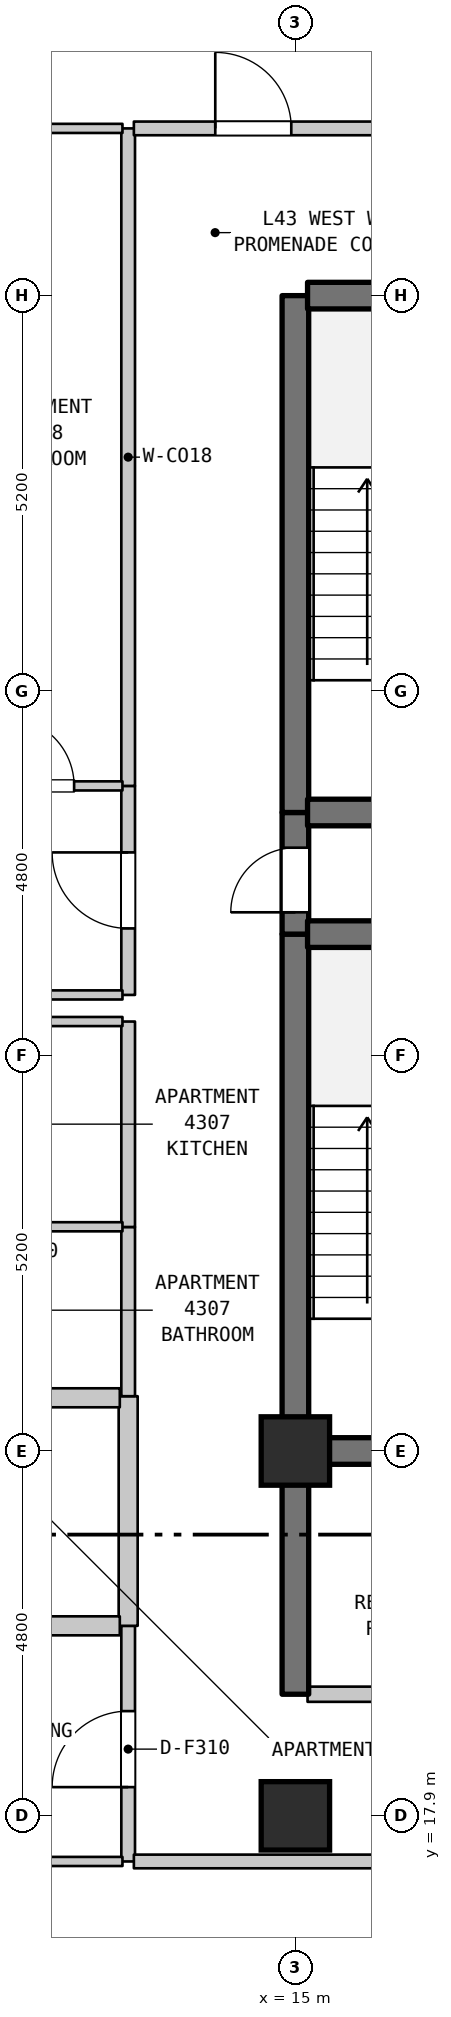
"""IFC4 building model, lengths in metres.
Left out: names, types, materials, properties, quantities, classifications, styles, units other than length and angle.
Written with IfcOpenShell. Run it as: python <this file> out.ifc"""

import sys

from ifc_helpers import new_model, si_unit, direction, frame, frame_2d, origin, origin_2d, place, context, subcontext, project, spatial, rectangle, extrude, element, fill, save


model = new_model("IFC4")
c1 = context("Model", 3, precision=1e-05, world=origin(), true_north=direction((0.0, 1.0)))
c2 = subcontext(c1, "Body", "Model", "MODEL_VIEW")
j1 = project(units=[si_unit("LENGTHUNIT", "METRE"), si_unit("PLANEANGLEUNIT", "RADIAN")], contexts=[c1])
p1 = place(None, origin())
s1 = spatial("IfcSite", under=j1, at=p1, CompositionType="ELEMENT")
p2 = place(p1, origin())
s2 = spatial("IfcBuilding", under=s1, at=p2, CompositionType="ELEMENT")
p3 = place(p2, frame((0.0, 0.0, 176.5)))
s3 = spatial("IfcBuildingStorey", under=s2, at=p3, CompositionType="ELEMENT", Elevation=176.5)
for number, where, z_axis, x_axis in (
    (1, (15.0, 17.9, 0.0), (0.0, 0.0, 1.0), (1.0, 0.0, 0.0)),
    (2, (15.0, 22.7, 0.0), (0.0, 0.0, 1.0), (1.0, 0.0, 0.0)),
):
    element("IfcColumn", number, at=place(p3, frame(where, z_axis=z_axis, x_axis=x_axis)), inside=s3, PredefinedType="COLUMN", context=c2, shape_type="SweptSolid", body=[
        extrude(rectangle(XDim=0.9, YDim=0.9, at=origin_2d()), origin(), (0.0, 0.0, 1.0), 3.7),
    ])
p4 = place(p3, frame((12.8, 17.3, 0.0), z_axis=(0.0, 0.0, 1.0), x_axis=(0.0, 1.0, 0.0)))
e3 = element("IfcWall", 3, at=p4, inside=s3, PredefinedType="STANDARD", context=c2, shape_type="SweptSolid", body=[
    extrude(rectangle(XDim=3.1, YDim=0.18, at=frame_2d((1.55, 0.0))), origin(), (0.0, 0.0, 1.0), 3.39),
])
p5 = place(p4, frame((0.978, 0.0, 0.0)))
e4 = element("IfcOpeningElement", 4, at=p5, cuts=e3, PredefinedType="OPENING", context=c2, shape_type="SweptSolid", body=[
    extrude(rectangle(XDim=1.0, YDim=2.15, at=frame_2d((0.5, 1.075))), frame((0.0, 0.1, 0.0), z_axis=(0.0, -1.0, 0.0), x_axis=(1.0, 0.0, 0.0)), (0.0, 0.0, 1.0), 0.2),
])
p6 = place(p3, frame((12.8, 20.4, 0.0), z_axis=(0.0, 0.0, 1.0), x_axis=(0.0, 1.0, 0.0)))
e5 = element("IfcWall", 5, at=p6, inside=s3, PredefinedType="STANDARD", context=c2, shape_type="SweptSolid", body=[
    extrude(rectangle(XDim=3.021, YDim=0.25, at=frame_2d((1.51, 0.0))), origin(), (0.0, 0.0, 1.0), 3.39),
])
p7 = place(p3, frame((12.8, 23.421, 0.0), z_axis=(0.0, 0.0, 1.0), x_axis=(0.0, 1.0, 0.0)))
e6 = element("IfcWall", 6, at=p7, inside=s3, PredefinedType="STANDARD", context=c2, shape_type="SweptSolid", body=[
    extrude(rectangle(XDim=2.226, YDim=0.18, at=frame_2d((1.113, 0.0))), origin(), (0.0, 0.0, 1.0), 3.39),
])
p8 = place(p3, frame((12.8, 25.647, 0.0), z_axis=(0.0, 0.0, 1.0), x_axis=(0.0, 1.0, 0.0)))
e7 = element("IfcWall", 7, at=p8, inside=s3, PredefinedType="STANDARD", context=c2, shape_type="SweptSolid", body=[
    extrude(rectangle(XDim=2.703, YDim=0.18, at=frame_2d((1.352, 0.0))), origin(), (0.0, 0.0, 1.0), 3.39),
])
p9 = place(p3, frame((12.8, 28.7, 0.0), z_axis=(0.0, 0.0, 1.0), x_axis=(0.0, 1.0, 0.0)))
e8 = element("IfcWall", 8, at=p9, inside=s3, PredefinedType="STANDARD", context=c2, shape_type="SweptSolid", body=[
    extrude(rectangle(XDim=2.75, YDim=0.18, at=frame_2d((1.375, 0.0))), origin(), (0.0, 0.0, 1.0), 3.39),
])
p10 = place(p9, frame((0.875, 0.0, 0.0)))
e9 = element("IfcOpeningElement", 9, at=p10, cuts=e8, PredefinedType="OPENING", context=c2, shape_type="SweptSolid", body=[
    extrude(rectangle(XDim=1.0, YDim=2.15, at=frame_2d((0.5, 1.075))), frame((0.0, 0.1, 0.0), z_axis=(0.0, -1.0, 0.0), x_axis=(1.0, 0.0, 0.0)), (0.0, 0.0, 1.0), 0.2),
])
p11 = place(p3, frame((12.8, 31.45, 0.0), z_axis=(0.0, 0.0, 1.0), x_axis=(0.0, 1.0, 0.0)))
e10 = element("IfcWall", 10, at=p11, inside=s3, PredefinedType="STANDARD", context=c2, shape_type="SweptSolid", body=[
    extrude(rectangle(XDim=8.65, YDim=0.18, at=frame_2d((4.325, 0.0))), origin(), (0.0, 0.0, 1.0), 3.39),
])
p12 = place(p3, frame((15.0, 19.5, 0.0), z_axis=(0.0, 0.0, 1.0), x_axis=(0.0, 1.0, 0.0)))
e11 = element("IfcWall", 11, at=p12, inside=s3, PredefinedType="SHEAR", context=c2, shape_type="SweptSolid", body=[
    extrude(rectangle(XDim=3.2, YDim=0.35, at=frame_2d((1.6, 0.0))), origin(), (0.0, 0.0, 1.0), 3.39),
])
p13 = place(p3, frame((15.0, 22.7, 0.0), z_axis=(0.0, 0.0, 1.0), x_axis=(0.0, 1.0, 0.0)))
e12 = element("IfcWall", 12, at=p13, inside=s3, PredefinedType="SHEAR", context=c2, shape_type="SweptSolid", body=[
    extrude(rectangle(XDim=6.8, YDim=0.35, at=frame_2d((3.4, 0.0))), origin(), (0.0, 0.0, 1.0), 3.39),
])
p14 = place(p3, frame((15.0, 29.5, 0.0), z_axis=(0.0, 0.0, 1.0), x_axis=(0.0, 1.0, 0.0)))
e13 = element("IfcWall", 13, at=p14, inside=s3, PredefinedType="SHEAR", context=c2, shape_type="SweptSolid", body=[
    extrude(rectangle(XDim=1.6, YDim=0.35, at=frame_2d((0.8, 0.0))), origin(), (0.0, 0.0, 1.0), 3.39),
])
p15 = place(p14, frame((0.287, 0.0, 0.0)))
e14 = element("IfcOpeningElement", 14, at=p15, cuts=e13, PredefinedType="OPENING", context=c2, shape_type="SweptSolid", body=[
    extrude(rectangle(XDim=0.85, YDim=2.1, at=frame_2d((0.425, 1.05))), frame((0.0, 0.185, 0.0), z_axis=(0.0, -1.0, 0.0), x_axis=(1.0, 0.0, 0.0)), (0.0, 0.0, 1.0), 0.37),
])
p16 = place(p3, frame((15.0, 31.1, 0.0), z_axis=(0.0, 0.0, 1.0), x_axis=(0.0, 1.0, 0.0)))
e15 = element("IfcWall", 15, at=p16, inside=s3, PredefinedType="SHEAR", context=c2, shape_type="SweptSolid", body=[
    extrude(rectangle(XDim=6.8, YDim=0.35, at=frame_2d((3.4, 0.0))), origin(), (0.0, 0.0, 1.0), 3.39),
])
p17 = place(p3, frame((9.085, 17.3, 0.0), z_axis=(0.0, 0.0, 1.0), x_axis=(1.0, 0.0, 0.0)))
e16 = element("IfcWall", 16, at=p17, inside=s3, PredefinedType="PARTITIONING", context=c2, shape_type="SweptSolid", body=[
    extrude(rectangle(XDim=3.64, YDim=0.12, at=frame_2d((1.82, 0.0))), origin(), (0.0, 0.0, 1.0), 3.39),
])
p18 = place(p3, frame((12.875, 17.3, 0.0), z_axis=(0.0, 0.0, 1.0), x_axis=(1.0, 0.0, 0.0)))
e17 = element("IfcWall", 17, at=p18, inside=s3, PredefinedType="STANDARD", context=c2, shape_type="SweptSolid", body=[
    extrude(rectangle(XDim=7.35, YDim=0.18, at=frame_2d((3.675, 0.0))), origin(), (0.0, 0.0, 1.0), 3.39),
])
p19 = place(p18, frame((3.16, 0.0, 0.0)))
e18 = element("IfcOpeningElement", 18, at=p19, cuts=e17, PredefinedType="OPENING", context=c2, shape_type="SweptSolid", body=[
    extrude(rectangle(XDim=1.0, YDim=2.15, at=frame_2d((0.5, 1.075))), frame((0.0, 0.1, 0.0), z_axis=(0.0, -1.0, 0.0), x_axis=(1.0, 0.0, 0.0)), (0.0, 0.0, 1.0), 0.2),
])
p20 = place(p3, frame((15.16, 19.5, 0.0), z_axis=(0.0, 0.0, 1.0), x_axis=(1.0, 0.0, 0.0)))
e19 = element("IfcWall", 19, at=p20, inside=s3, PredefinedType="STANDARD", context=c2, shape_type="SweptSolid", body=[
    extrude(rectangle(XDim=3.68, YDim=0.2, at=frame_2d((1.84, 0.0))), origin(), (0.0, 0.0, 1.0), 3.39),
])
p21 = place(p20, frame((1.39, 0.0, 0.0)))
e20 = element("IfcOpeningElement", 20, at=p21, cuts=e19, PredefinedType="OPENING", context=c2, shape_type="SweptSolid", body=[
    extrude(rectangle(XDim=0.9, YDim=2.15, at=frame_2d((0.45, 1.075))), frame((0.0, 0.11, 0.0), z_axis=(0.0, -1.0, 0.0), x_axis=(1.0, 0.0, 0.0)), (0.0, 0.0, 1.0), 0.22),
])
p22 = place(p3, frame((10.66, 20.4, 0.0), z_axis=(0.0, 0.0, 1.0), x_axis=(1.0, 0.0, 0.0)))
e21 = element("IfcWall", 21, at=p22, inside=s3, PredefinedType="STANDARD", context=c2, shape_type="SweptSolid", body=[
    extrude(rectangle(XDim=2.03, YDim=0.25, at=frame_2d((1.015, 0.0))), origin(), (0.0, 0.0, 1.0), 3.39),
])
p23 = place(p3, frame((15.16, 22.7, 0.0), z_axis=(0.0, 0.0, 1.0), x_axis=(1.0, 0.0, 0.0)))
e22 = element("IfcWall", 22, at=p23, inside=s3, PredefinedType="SHEAR", context=c2, shape_type="SweptSolid", body=[
    extrude(rectangle(XDim=3.68, YDim=0.35, at=frame_2d((1.84, 0.0))), origin(), (0.0, 0.0, 1.0), 3.39),
])
p24 = place(p3, frame((10.66, 23.4, 0.0), z_axis=(0.0, 0.0, 1.0), x_axis=(1.0, 0.0, 0.0)))
e23 = element("IfcWall", 23, at=p24, inside=s3, PredefinedType="STANDARD", context=c2, shape_type="SweptSolid", body=[
    extrude(rectangle(XDim=2.03, YDim=0.25, at=frame_2d((1.015, 0.0))), origin(), (0.0, 0.0, 1.0), 3.39),
])
for number, where, z_axis, x_axis in (
    (24, (10.595, 25.65, 0.0), (0.0, 0.0, 1.0), (1.0, 0.0, 0.0)),
    (25, (10.595, 28.35, 0.0), (0.0, 0.0, 1.0), (1.0, 0.0, 0.0)),
):
    element("IfcWall", number, at=place(p3, frame(where, z_axis=z_axis, x_axis=x_axis)), inside=s3, PredefinedType="PARTITIONING", context=c2, shape_type="SweptSolid", body=[
        extrude(rectangle(XDim=2.13, YDim=0.12, at=frame_2d((1.065, 0.0))), origin(), (0.0, 0.0, 1.0), 3.39),
    ])
p25 = place(p3, frame((9.03, 28.7, 0.0), z_axis=(0.0, 0.0, 1.0), x_axis=(1.0, 0.0, 0.0)))
e26 = element("IfcWall", 26, at=p25, inside=s3, PredefinedType="PARTITIONING", context=c2, shape_type="SweptSolid", body=[
    extrude(rectangle(XDim=3.695, YDim=0.12, at=frame_2d((1.848, 0.0))), origin(), (0.0, 0.0, 1.0), 3.39),
])
for number, where, z_axis, x_axis in (
    (27, (15.16, 29.5, 0.0), (0.0, 0.0, 1.0), (1.0, 0.0, 0.0)),
    (28, (15.16, 31.1, 0.0), (0.0, 0.0, 1.0), (1.0, 0.0, 0.0)),
):
    element("IfcWall", number, at=place(p3, frame(where, z_axis=z_axis, x_axis=x_axis)), inside=s3, PredefinedType="SHEAR", context=c2, shape_type="SweptSolid", body=[
        extrude(rectangle(XDim=3.68, YDim=0.35, at=frame_2d((1.84, 0.0))), origin(), (0.0, 0.0, 1.0), 3.39),
    ])
p26 = place(p3, frame((10.523, 31.45, 0.0), z_axis=(0.0, 0.0, 1.0), x_axis=(1.0, 0.0, 0.0)))
e29 = element("IfcWall", 29, at=p26, inside=s3, PredefinedType="PARTITIONING", context=c2, shape_type="SweptSolid", body=[
    extrude(rectangle(XDim=2.202, YDim=0.12, at=frame_2d((1.101, 0.0))), origin(), (0.0, 0.0, 1.0), 3.39),
])
p27 = place(p26, frame((0.666, 0.0, 0.0)))
e30 = element("IfcOpeningElement", 30, at=p27, cuts=e29, PredefinedType="OPENING", context=c2, shape_type="SweptSolid", body=[
    extrude(rectangle(XDim=0.9, YDim=2.1, at=frame_2d((0.45, 1.05))), frame((0.0, 0.07, 0.0), z_axis=(0.0, -1.0, 0.0), x_axis=(1.0, 0.0, 0.0)), (0.0, 0.0, 1.0), 0.14),
])
p28 = place(p3, frame((15.16, 37.9, 0.0), z_axis=(0.0, 0.0, 1.0), x_axis=(1.0, 0.0, 0.0)))
e31 = element("IfcWall", 31, at=p28, inside=s3, PredefinedType="SHEAR", context=c2, shape_type="SweptSolid", body=[
    extrude(rectangle(XDim=3.68, YDim=0.35, at=frame_2d((1.84, 0.0))), origin(), (0.0, 0.0, 1.0), 3.39),
])
p29 = place(p3, frame((10.523, 40.1, 0.0), z_axis=(0.0, 0.0, 1.0), x_axis=(1.0, 0.0, 0.0)))
e32 = element("IfcWall", 32, at=p29, inside=s3, PredefinedType="PARTITIONING", context=c2, shape_type="SweptSolid", body=[
    extrude(rectangle(XDim=2.202, YDim=0.12, at=frame_2d((1.101, 0.0))), origin(), (0.0, 0.0, 1.0), 3.39),
])
p30 = place(p3, frame((12.875, 40.1, 0.0), z_axis=(0.0, 0.0, 1.0), x_axis=(1.0, 0.0, 0.0)))
e33 = element("IfcWall", 33, at=p30, inside=s3, PredefinedType="STANDARD", context=c2, shape_type="SweptSolid", body=[
    extrude(rectangle(XDim=3.32, YDim=0.18, at=frame_2d((1.66, 0.0))), origin(), (0.0, 0.0, 1.0), 3.39),
])
p31 = place(p30, frame((1.071, 0.0, 0.0)))
e34 = element("IfcOpeningElement", 34, at=p31, cuts=e33, PredefinedType="OPENING", context=c2, shape_type="SweptSolid", body=[
    extrude(rectangle(XDim=1.0, YDim=2.15, at=frame_2d((0.5, 1.075))), frame((0.0, 0.1, 0.0), z_axis=(0.0, -1.0, 0.0), x_axis=(1.0, 0.0, 0.0)), (0.0, 0.0, 1.0), 0.2),
])
p32 = place(p5, origin())
e35 = element("IfcDoor", 35, at=p32, inside=s3, OperationType="SINGLE_SWING_LEFT", PredefinedType="DOOR", context=c2, shape_type="SweptSolid", body=[
    extrude(rectangle(XDim=1.0, YDim=2.15, at=frame_2d((0.5, 1.075))), frame((0.0, 0.025, 0.0), z_axis=(0.0, -1.0, 0.0), x_axis=(1.0, 0.0, 0.0)), (0.0, 0.0, 1.0), 0.05),
])
fill(e4, e35)
p33 = place(p10, origin())
e36 = element("IfcDoor", 36, at=p33, inside=s3, OperationType="SINGLE_SWING_RIGHT", PredefinedType="DOOR", context=c2, shape_type="SweptSolid", body=[
    extrude(rectangle(XDim=1.0, YDim=2.15, at=frame_2d((0.5, 1.075))), frame((0.0, 0.025, 0.0), z_axis=(0.0, -1.0, 0.0), x_axis=(1.0, 0.0, 0.0)), (0.0, 0.0, 1.0), 0.05),
])
fill(e9, e36)
p34 = place(p15, origin())
e37 = element("IfcDoor", 37, at=p34, inside=s3, OperationType="SINGLE_SWING_LEFT", PredefinedType="DOOR", context=c2, shape_type="SweptSolid", body=[
    extrude(rectangle(XDim=0.85, YDim=2.1, at=frame_2d((0.425, 1.05))), frame((0.0, 0.025, 0.0), z_axis=(0.0, -1.0, 0.0), x_axis=(1.0, 0.0, 0.0)), (0.0, 0.0, 1.0), 0.05),
])
fill(e14, e37)
p35 = place(p27, origin())
e38 = element("IfcDoor", 38, at=p35, inside=s3, OperationType="SINGLE_SWING_LEFT", PredefinedType="DOOR", context=c2, shape_type="SweptSolid", body=[
    extrude(rectangle(XDim=0.9, YDim=2.1, at=frame_2d((0.45, 1.05))), frame((0.0, 0.025, 0.0), z_axis=(0.0, -1.0, 0.0), x_axis=(1.0, 0.0, 0.0)), (0.0, 0.0, 1.0), 0.05),
])
fill(e30, e38)
p36 = place(p31, origin())
e39 = element("IfcDoor", 39, at=p36, inside=s3, OperationType="SINGLE_SWING_LEFT", PredefinedType="DOOR", context=c2, shape_type="SweptSolid", body=[
    extrude(rectangle(XDim=1.0, YDim=2.15, at=frame_2d((0.5, 1.075))), frame((0.0, 0.025, 0.0), z_axis=(0.0, -1.0, 0.0), x_axis=(1.0, 0.0, 0.0)), (0.0, 0.0, 1.0), 0.05),
])
fill(e34, e39)
save(model, sys.argv[1])
